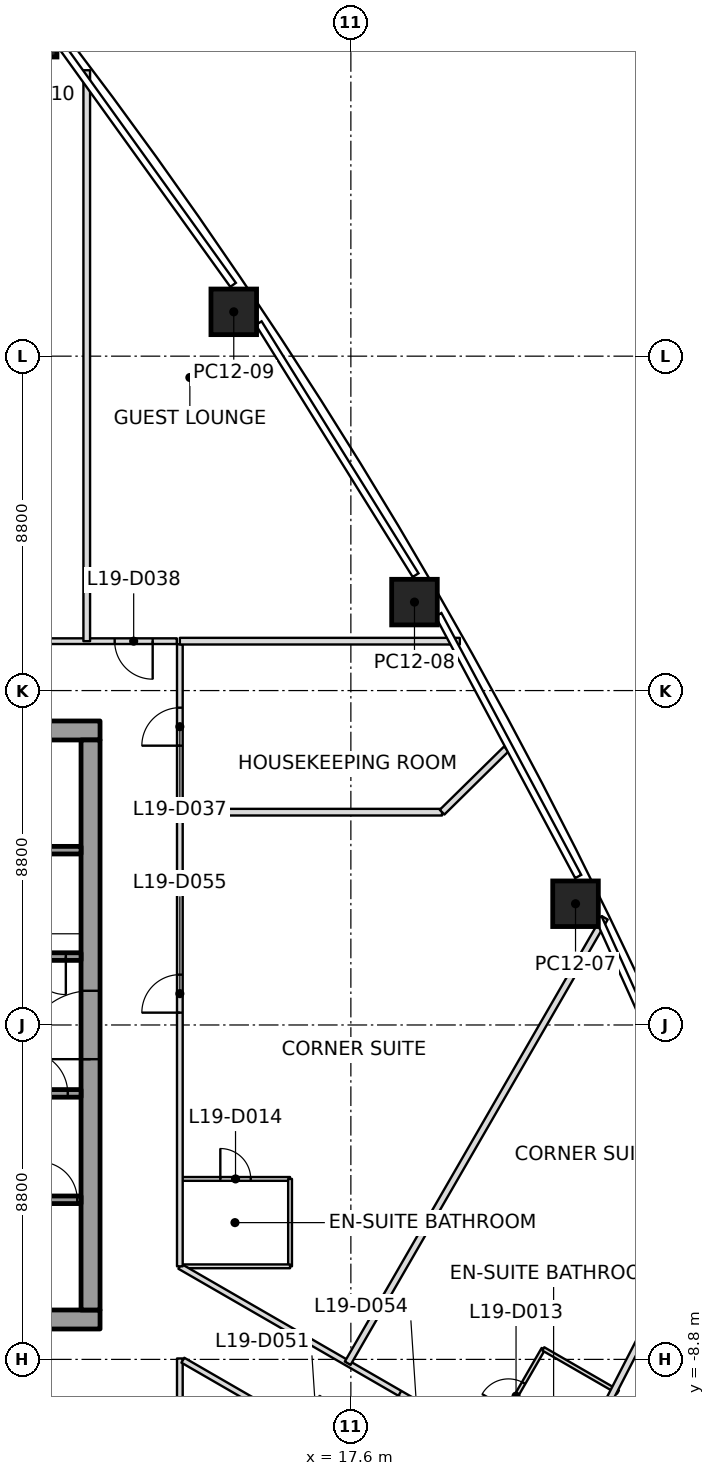
"""IFC4 building model, lengths in metres.
Left out: names, types, materials, properties, quantities, classifications, styles, units other than length and angle.
Written with IfcOpenShell. Run it as: python <this file> out.ifc"""

import sys

from ifc_helpers import new_model, si_unit, direction, frame, frame_2d, origin, origin_2d, place, context, subcontext, project, spatial, rectangle, extrude, element, fill, save


model = new_model("IFC4")
c1 = context("Model", 3, precision=1e-05, world=origin(), true_north=direction((0.0, 1.0)))
c2 = subcontext(c1, "Body", "Model", "MODEL_VIEW")
j1 = project(units=[si_unit("LENGTHUNIT", "METRE"), si_unit("PLANEANGLEUNIT", "RADIAN")], contexts=[c1])
p1 = place(None, origin())
s1 = spatial("IfcSite", under=j1, at=p1, CompositionType="ELEMENT")
p2 = place(p1, origin())
s2 = spatial("IfcBuilding", under=s1, at=p2, CompositionType="ELEMENT")
p3 = place(p2, frame((0.0, 0.0, 92.4)))
s3 = spatial("IfcBuildingStorey", under=s2, at=p3, CompositionType="ELEMENT", Elevation=92.4)
p4 = place(p3, frame((23.512, 3.19, 0.0), z_axis=(-0.015305637388, 0.002243067548, 0.999880345898), x_axis=(-0.441317903512, 0.897307986586, -0.008768423407)))
e1 = element("IfcColumn", 1, at=p4, inside=s3, PredefinedType="COLUMN", context=c2, shape_type="SweptSolid", body=[
    extrude(rectangle(XDim=1.2, YDim=1.2, at=origin_2d()), origin(), (0.0, 0.0, 1.0), 3.701),
])
p5 = place(p3, frame((19.274, 11.128, 0.0), z_axis=(-0.010688020009, -0.006201690622, 0.999923649716), x_axis=(-0.499971440741, 0.866041891424, 2.7221193e-05)))
e2 = element("IfcColumn", 2, at=p5, inside=s3, PredefinedType="COLUMN", context=c2, shape_type="SweptSolid", body=[
    extrude(rectangle(XDim=1.2, YDim=1.2, at=origin_2d()), origin(), (0.0, 0.0, 1.0), 3.7),
])
p6 = place(p3, frame((14.519, 18.767, 0.0), z_axis=(-0.005673642186, -0.014382023216, 0.999880476453), x_axis=(-0.556412833057, 0.830859453665, 0.008793603672)))
e3 = element("IfcColumn", 3, at=p6, inside=s3, PredefinedType="COLUMN", context=c2, shape_type="SweptSolid", body=[
    extrude(rectangle(XDim=1.2, YDim=1.2, at=origin_2d()), origin(), (0.0, 0.0, 1.0), 3.701),
])
p7 = place(p3, frame((9.266, 26.073, 0.0), z_axis=(-0.000197892201, -0.02229585459, 0.999751396952), x_axis=(-0.610385732105, 0.79191010258, 0.017539882388)))
e4 = element("IfcColumn", 4, at=p7, inside=s3, PredefinedType="COLUMN", context=c2, shape_type="SweptSolid", body=[
    extrude(rectangle(XDim=1.2, YDim=1.2, at=origin_2d()), origin(), (0.0, 0.0, 1.0), 3.701),
])
p8 = place(p3, frame((-11.0, -7.75, 0.0), z_axis=(0.0, 0.0, 1.0), x_axis=(1.0, 0.0, 0.0)))
e5 = element("IfcWall", 5, at=p8, inside=s3, PredefinedType="SHEAR", context=c2, shape_type="SweptSolid", body=[
    extrude(rectangle(XDim=22.0, YDim=0.5, at=frame_2d((11.0, 0.0))), origin(), (0.0, 0.0, 1.0), 3.7),
])
p9 = place(p8, frame((10.45, 0.0, 0.0)))
e6 = element("IfcOpeningElement", 6, at=p9, cuts=e5, PredefinedType="OPENING", context=c2, shape_type="SweptSolid", body=[
    extrude(rectangle(XDim=1.1, YDim=2.1, at=frame_2d((0.55, 1.05))), frame((0.0, 0.25, 0.0), z_axis=(0.0, -1.0, 0.0), x_axis=(1.0, 0.0, 0.0)), (0.0, 0.0, 1.0), 0.5),
])
p10 = place(p3, frame((-11.0, 7.75, 0.0), z_axis=(0.0, 0.0, 1.0), x_axis=(1.0, 0.0, 0.0)))
e7 = element("IfcWall", 7, at=p10, inside=s3, PredefinedType="SHEAR", context=c2, shape_type="SweptSolid", body=[
    extrude(rectangle(XDim=22.0, YDim=0.5, at=frame_2d((11.0, 0.0))), origin(), (0.0, 0.0, 1.0), 3.7),
])
p11 = place(p10, frame((10.45, 0.0, 0.0)))
e8 = element("IfcOpeningElement", 8, at=p11, cuts=e7, PredefinedType="OPENING", context=c2, shape_type="SweptSolid", body=[
    extrude(rectangle(XDim=1.1, YDim=2.1, at=frame_2d((0.55, 1.05))), frame((0.0, 0.25, 0.0), z_axis=(0.0, -1.0, 0.0), x_axis=(1.0, 0.0, 0.0)), (0.0, 0.0, 1.0), 0.5),
])
p12 = place(p3, frame((10.75, -7.5, 0.0), z_axis=(0.0, 0.0, 1.0), x_axis=(0.0, 1.0, 0.0)))
e9 = element("IfcWall", 9, at=p12, inside=s3, PredefinedType="SHEAR", context=c2, shape_type="SweptSolid", body=[
    extrude(rectangle(XDim=15.0, YDim=0.5, at=frame_2d((7.5, 0.0))), origin(), (0.0, 0.0, 1.0), 3.7),
])
p13 = place(p12, frame((6.6, 0.0, 0.0)))
e10 = element("IfcOpeningElement", 10, at=p13, cuts=e9, PredefinedType="OPENING", context=c2, shape_type="SweptSolid", body=[
    extrude(rectangle(XDim=1.8, YDim=2.1, at=frame_2d((0.9, 1.05))), frame((0.0, 0.25, 0.0), z_axis=(0.0, -1.0, 0.0), x_axis=(1.0, 0.0, 0.0)), (0.0, 0.0, 1.0), 0.5),
])
p14 = place(p3, frame((8.7, -4.6, 0.0), z_axis=(0.0, 0.0, 1.0), x_axis=(1.0, 0.0, 0.0)))
e11 = element("IfcWall", 11, at=p14, inside=s3, PredefinedType="SOLIDWALL", context=c2, shape_type="SweptSolid", body=[
    extrude(rectangle(XDim=1.8, YDim=0.2, at=frame_2d((0.9, 0.0))), origin(), (0.0, 0.0, 1.0), 3.55),
])
p15 = place(p14, frame((0.7, 0.0, 0.0)))
e12 = element("IfcOpeningElement", 12, at=p15, cuts=e11, PredefinedType="OPENING", context=c2, shape_type="SweptSolid", body=[
    extrude(rectangle(XDim=1.0, YDim=2.1, at=frame_2d((0.5, 1.05))), frame((0.0, 0.1, 0.0), z_axis=(0.0, -1.0, 0.0), x_axis=(1.0, 0.0, 0.0)), (0.0, 0.0, 1.0), 0.2),
])
p16 = place(p3, frame((8.7, -1.8, 0.0), z_axis=(0.0, 0.0, 1.0), x_axis=(1.0, 0.0, 0.0)))
e13 = element("IfcWall", 13, at=p16, inside=s3, PredefinedType="SOLIDWALL", context=c2, shape_type="SweptSolid", body=[
    extrude(rectangle(XDim=1.8, YDim=0.2, at=frame_2d((0.9, 0.0))), origin(), (0.0, 0.0, 1.0), 3.55),
])
p17 = place(p16, frame((0.35, 0.0, 0.0)))
e14 = element("IfcOpeningElement", 14, at=p17, cuts=e13, PredefinedType="OPENING", context=c2, shape_type="SweptSolid", body=[
    extrude(rectangle(XDim=1.1, YDim=2.1, at=frame_2d((0.55, 1.05))), frame((0.0, 0.1, 0.0), z_axis=(0.0, -1.0, 0.0), x_axis=(1.0, 0.0, 0.0)), (0.0, 0.0, 1.0), 0.2),
])
p18 = place(p3, frame((10.5, 1.8, 0.0), z_axis=(0.0, 0.0, 1.0), x_axis=(-1.0, 0.0, 0.0)))
e15 = element("IfcWall", 15, at=p18, inside=s3, PredefinedType="SOLIDWALL", context=c2, shape_type="SweptSolid", body=[
    extrude(rectangle(XDim=1.8, YDim=0.2, at=frame_2d((0.9, 0.0))), origin(), (0.0, 0.0, 1.0), 3.55),
])
p19 = place(p18, frame((0.4, 0.0, 0.0)))
e16 = element("IfcOpeningElement", 16, at=p19, cuts=e15, PredefinedType="OPENING", context=c2, shape_type="SweptSolid", body=[
    extrude(rectangle(XDim=1.0, YDim=2.1, at=frame_2d((0.5, 1.05))), frame((0.0, 0.1, 0.0), z_axis=(0.0, -1.0, 0.0), x_axis=(1.0, 0.0, 0.0)), (0.0, 0.0, 1.0), 0.2),
])
p20 = place(p3, frame((10.5, 4.6, 0.0), z_axis=(0.0, 0.0, 1.0), x_axis=(-1.0, 0.0, 0.0)))
e17 = element("IfcWall", 17, at=p20, inside=s3, PredefinedType="SOLIDWALL", context=c2, shape_type="SweptSolid", body=[
    extrude(rectangle(XDim=1.8, YDim=0.2, at=frame_2d((0.9, 0.0))), origin(), (0.0, 0.0, 1.0), 3.55),
])
p21 = place(p3, frame((10.65, 25.124, 0.0), z_axis=(0.0, 0.0, 1.0), x_axis=(0.0, -1.0, 0.0)))
e18 = element("IfcWall", 18, at=p21, inside=s3, PredefinedType="PARTITIONING", context=c2, shape_type="SweptSolid", body=[
    extrude(rectangle(XDim=15.024, YDim=0.175, at=frame_2d((7.512, 0.0))), origin(), (0.0, 0.0, 1.0), 2.934),
])
p22 = place(p3, frame((13.1, 5.6, 0.0), z_axis=(0.0, 0.0, 1.0), x_axis=(1.0, 0.0, 0.0)))
e19 = element("IfcWall", 19, at=p22, inside=s3, PredefinedType="PARTITIONING", context=c2, shape_type="SweptSolid", body=[
    extrude(rectangle(XDim=6.9, YDim=0.175, at=frame_2d((3.45, 0.0))), origin(), (0.0, 0.0, 1.0), 3.017),
])
p23 = place(p3, frame((20.0, 5.6, 0.0), z_axis=(0.0, 0.0, 1.0), x_axis=(0.712635597267, 0.701534393675, 0.0)))
e20 = element("IfcWall", 20, at=p23, inside=s3, PredefinedType="PARTITIONING", context=c2, shape_type="SweptSolid", body=[
    extrude(rectangle(XDim=2.375, YDim=0.175, at=frame_2d((1.188, 0.0))), origin(), (0.0, 0.0, 1.0), 2.934),
])
p24 = place(p3, frame((13.1, 10.1, 0.0), z_axis=(0.0, 0.0, 1.0), x_axis=(1.0, 0.0, 0.0)))
e21 = element("IfcWall", 21, at=p24, inside=s3, PredefinedType="PARTITIONING", context=c2, shape_type="SweptSolid", body=[
    extrude(rectangle(XDim=7.367, YDim=0.175, at=frame_2d((3.684, 0.0))), origin(), (0.0, 0.0, 1.0), 2.934),
])
p25 = place(p3, frame((17.517, -8.901, 0.0), z_axis=(0.0, 0.0, 1.0), x_axis=(0.500006156857, 0.866021849092, 0.0)))
e22 = element("IfcWall", 22, at=p25, inside=s3, PredefinedType="PARTITIONING", context=c2, shape_type="SweptSolid", body=[
    extrude(rectangle(XDim=13.532, YDim=0.175, at=frame_2d((6.766, 0.0))), origin(), (0.0, 0.0, 1.0), 2.934),
])
p26 = place(p3, frame((27.253, -4.326, 0.0), z_axis=(0.0, 0.0, 1.0), x_axis=(-0.457797857942, -0.889056309389, 0.0)))
e23 = element("IfcWall", 23, at=p26, inside=s3, PredefinedType="PARTITIONING", context=c2, shape_type="SweptSolid", body=[
    extrude(rectangle(XDim=8.84, YDim=0.175, at=frame_2d((4.42, 0.0))), origin(), (0.0, 0.0, 1.0), 3.15),
])
p27 = place(p3, frame((13.02, 10.1, 0.0), z_axis=(0.0, 0.0, 1.0), x_axis=(-1.0, 0.0, 0.0)))
e24 = element("IfcWall", 24, at=p27, inside=s3, PredefinedType="PARTITIONING", context=c2, shape_type="SweptSolid", body=[
    extrude(rectangle(XDim=11.97, YDim=0.15, at=frame_2d((5.985, 0.0))), origin(), (0.0, 0.0, 1.0), 2.947),
])
p28 = place(p27, frame((0.635, 0.0, 0.0)))
e25 = element("IfcOpeningElement", 25, at=p28, cuts=e24, PredefinedType="OPENING", context=c2, shape_type="SweptSolid", body=[
    extrude(rectangle(XDim=1.0, YDim=2.1, at=frame_2d((0.5, 1.05))), frame((0.0, 0.075, 0.0), z_axis=(0.0, -1.0, 0.0), x_axis=(1.0, 0.0, 0.0)), (0.0, 0.0, 1.0), 0.15),
])
p29 = place(p3, frame((13.1, -10.02, 0.0), z_axis=(0.0, 0.0, 1.0), x_axis=(0.0, 1.0, 0.0)))
e26 = element("IfcWall", 26, at=p29, inside=s3, PredefinedType="PARTITIONING", context=c2, shape_type="SweptSolid", body=[
    extrude(rectangle(XDim=1.244, YDim=0.15, at=frame_2d((0.622, 0.0))), origin(), (0.0, 0.0, 1.0), 2.797),
])
p30 = place(p3, frame((13.179, -8.822, 0.0), z_axis=(0.0, 0.0, 1.0), x_axis=(0.866025889145, -0.499999159329, 0.0)))
e27 = element("IfcWall", 27, at=p30, inside=s3, PredefinedType="PARTITIONING", context=c2, shape_type="SweptSolid", body=[
    extrude(rectangle(XDim=10.285, YDim=0.15, at=frame_2d((5.143, 0.0))), origin(), (0.0, 0.0, 1.0), 2.797),
])
p31 = place(p30, frame((3.587, 0.0, 0.0)))
e28 = element("IfcOpeningElement", 28, at=p31, cuts=e27, PredefinedType="OPENING", context=c2, shape_type="SweptSolid", body=[
    extrude(rectangle(XDim=1.0, YDim=2.1, at=frame_2d((0.5, 1.05))), frame((0.0, 0.075, 0.0), z_axis=(0.0, -1.0, 0.0), x_axis=(1.0, 0.0, 0.0)), (0.0, 0.0, 1.0), 0.15),
])
p32 = place(p30, frame((7.615, 0.0, 0.0)))
e29 = element("IfcOpeningElement", 29, at=p32, cuts=e27, PredefinedType="OPENING", context=c2, shape_type="SweptSolid", body=[
    extrude(rectangle(XDim=1.0, YDim=2.1, at=frame_2d((0.5, 1.05))), frame((0.0, 0.075, 0.0), z_axis=(0.0, -1.0, 0.0), x_axis=(1.0, 0.0, 0.0)), (0.0, 0.0, 1.0), 0.15),
])
p33 = place(p3, frame((23.136, -12.145, 0.0), z_axis=(0.0, 0.0, 1.0), x_axis=(-0.866028069402, 0.499995382986, 0.0)))
e30 = element("IfcWall", 30, at=p33, inside=s3, PredefinedType="PARTITIONING", context=c2, shape_type="SweptSolid", body=[
    extrude(rectangle(XDim=11.589, YDim=0.15, at=frame_2d((5.794, 0.0))), origin(), (0.0, 0.0, 1.0), 2.947),
])
p34 = place(p33, frame((3.905, 0.0, 0.0)))
e31 = element("IfcOpeningElement", 31, at=p34, cuts=e30, PredefinedType="OPENING", context=c2, shape_type="SweptSolid", body=[
    extrude(rectangle(XDim=1.0, YDim=2.1, at=frame_2d((0.5, 1.05))), frame((0.0, 0.075, 0.0), z_axis=(0.0, -1.0, 0.0), x_axis=(1.0, 0.0, 0.0)), (0.0, 0.0, 1.0), 0.15),
])
p35 = place(p3, frame((13.1, -6.351, 0.0), z_axis=(0.0, 0.0, 1.0), x_axis=(0.0, 1.0, 0.0)))
e32 = element("IfcWall", 32, at=p35, inside=s3, PredefinedType="PARTITIONING", context=c2, shape_type="SweptSolid", body=[
    extrude(rectangle(XDim=16.371, YDim=0.15, at=frame_2d((8.186, 0.0))), origin(), (0.0, 0.0, 1.0), 2.947),
])
p36 = place(p35, frame((13.701, 0.0, 0.0)))
e33 = element("IfcOpeningElement", 33, at=p36, cuts=e32, PredefinedType="OPENING", context=c2, shape_type="SweptSolid", body=[
    extrude(rectangle(XDim=1.0, YDim=2.1, at=frame_2d((0.5, 1.05))), frame((0.0, 0.075, 0.0), z_axis=(0.0, -1.0, 0.0), x_axis=(1.0, 0.0, 0.0)), (0.0, 0.0, 1.0), 0.15),
])
p37 = place(p35, frame((6.676, 0.0, 0.0)))
e34 = element("IfcOpeningElement", 34, at=p37, cuts=e32, PredefinedType="OPENING", context=c2, shape_type="SweptSolid", body=[
    extrude(rectangle(XDim=1.0, YDim=2.1, at=frame_2d((0.5, 1.05))), frame((0.0, 0.075, 0.0), z_axis=(0.0, -1.0, 0.0), x_axis=(1.0, 0.0, 0.0)), (0.0, 0.0, 1.0), 0.15),
])
p38 = place(p3, frame((13.13, -4.051, 0.0), z_axis=(0.0, 0.0, 1.0), x_axis=(1.0, 0.0, 0.0)))
e35 = element("IfcWall", 35, at=p38, inside=s3, PredefinedType="PARTITIONING", context=c2, shape_type="SweptSolid", body=[
    extrude(rectangle(XDim=2.87, YDim=0.1, at=frame_2d((1.435, 0.0))), origin(), (0.0, 0.0, 1.0), 2.947),
])
p39 = place(p38, frame((1.035, 0.0, 0.0)))
e36 = element("IfcOpeningElement", 36, at=p39, cuts=e35, PredefinedType="OPENING", context=c2, shape_type="SweptSolid", body=[
    extrude(rectangle(XDim=0.8, YDim=2.1, at=frame_2d((0.4, 1.05))), frame((0.0, 0.05, 0.0), z_axis=(0.0, -1.0, 0.0), x_axis=(1.0, 0.0, 0.0)), (0.0, 0.0, 1.0), 0.1),
])
p40 = place(p3, frame((16.0, -4.051, 0.0), z_axis=(0.0, 0.0, 1.0), x_axis=(0.0, -1.0, 0.0)))
e37 = element("IfcWall", 37, at=p40, inside=s3, PredefinedType="PARTITIONING", context=c2, shape_type="SweptSolid", body=[
    extrude(rectangle(XDim=2.3, YDim=0.1, at=frame_2d((1.15, 0.0))), origin(), (0.0, 0.0, 1.0), 3.15),
])
p41 = place(p3, frame((16.0, -6.351, 0.0), z_axis=(0.0, 0.0, 1.0), x_axis=(-1.0, 0.0, 0.0)))
e38 = element("IfcWall", 38, at=p41, inside=s3, PredefinedType="PARTITIONING", context=c2, shape_type="SweptSolid", body=[
    extrude(rectangle(XDim=2.84, YDim=0.1, at=frame_2d((1.42, 0.0))), origin(), (0.0, 0.0, 1.0), 3.15),
])
p42 = place(p3, frame((21.229, -11.01, 0.0), z_axis=(0.0, 0.0, 1.0), x_axis=(0.499999802827, 0.866025517622, 0.0)))
e39 = element("IfcWall", 39, at=p42, inside=s3, PredefinedType="PARTITIONING", context=c2, shape_type="SweptSolid", body=[
    extrude(rectangle(XDim=2.87, YDim=0.1, at=frame_2d((1.435, 0.0))), origin(), (0.0, 0.0, 1.0), 3.15),
])
p43 = place(p42, frame((1.035, 0.0, 0.0)))
e40 = element("IfcOpeningElement", 40, at=p43, cuts=e39, PredefinedType="OPENING", context=c2, shape_type="SweptSolid", body=[
    extrude(rectangle(XDim=0.8, YDim=2.1, at=frame_2d((0.4, 1.05))), frame((0.0, 0.05, 0.0), z_axis=(0.0, -1.0, 0.0), x_axis=(1.0, 0.0, 0.0)), (0.0, 0.0, 1.0), 0.1),
])
p44 = place(p3, frame((22.664, -8.524, 0.0), z_axis=(0.0, 0.0, 1.0), x_axis=(0.866017224141, -0.500014167291, 0.0)))
e41 = element("IfcWall", 41, at=p44, inside=s3, PredefinedType="PARTITIONING", context=c2, shape_type="SweptSolid", body=[
    extrude(rectangle(XDim=2.27, YDim=0.1, at=frame_2d((1.135, 0.0))), origin(), (0.0, 0.0, 1.0), 3.15),
])
p45 = place(p36, origin())
e42 = element("IfcDoor", 42, at=p45, inside=s3, OperationType="SINGLE_SWING_RIGHT", PredefinedType="DOOR", context=c2, shape_type="SweptSolid", body=[
    extrude(rectangle(XDim=1.0, YDim=2.1, at=frame_2d((0.5, 1.05))), frame((0.0, 0.025, 0.0), z_axis=(0.0, -1.0, 0.0), x_axis=(1.0, 0.0, 0.0)), (0.0, 0.0, 1.0), 0.05),
])
fill(e33, e42)
p46 = place(p28, origin())
e43 = element("IfcDoor", 43, at=p46, inside=s3, OperationType="SINGLE_SWING_LEFT", PredefinedType="DOOR", context=c2, shape_type="SweptSolid", body=[
    extrude(rectangle(XDim=1.0, YDim=2.1, at=frame_2d((0.5, 1.05))), frame((0.0, 0.025, 0.0), z_axis=(0.0, -1.0, 0.0), x_axis=(1.0, 0.0, 0.0)), (0.0, 0.0, 1.0), 0.05),
])
fill(e25, e43)
p47 = place(p34, origin())
e44 = element("IfcDoor", 44, at=p47, inside=s3, OperationType="SINGLE_SWING_LEFT", PredefinedType="DOOR", context=c2, shape_type="SweptSolid", body=[
    extrude(rectangle(XDim=1.0, YDim=2.1, at=frame_2d((0.5, 1.05))), frame((0.0, 0.025, 0.0), z_axis=(0.0, -1.0, 0.0), x_axis=(1.0, 0.0, 0.0)), (0.0, 0.0, 1.0), 0.05),
])
fill(e31, e44)
p48 = place(p43, origin())
e45 = element("IfcDoor", 45, at=p48, inside=s3, OperationType="SINGLE_SWING_LEFT", PredefinedType="DOOR", context=c2, shape_type="SweptSolid", body=[
    extrude(rectangle(XDim=0.8, YDim=2.1, at=frame_2d((0.4, 1.05))), frame((0.0, 0.025, 0.0), z_axis=(0.0, -1.0, 0.0), x_axis=(1.0, 0.0, 0.0)), (0.0, 0.0, 1.0), 0.05),
])
fill(e40, e45)
p49 = place(p37, origin())
e46 = element("IfcDoor", 46, at=p49, inside=s3, OperationType="SINGLE_SWING_LEFT", PredefinedType="DOOR", context=c2, shape_type="SweptSolid", body=[
    extrude(rectangle(XDim=1.0, YDim=2.1, at=frame_2d((0.5, 1.05))), frame((0.0, 0.025, 0.0), z_axis=(0.0, -1.0, 0.0), x_axis=(1.0, 0.0, 0.0)), (0.0, 0.0, 1.0), 0.05),
])
fill(e34, e46)
p50 = place(p39, origin())
e47 = element("IfcDoor", 47, at=p50, inside=s3, OperationType="SINGLE_SWING_LEFT", PredefinedType="DOOR", context=c2, shape_type="SweptSolid", body=[
    extrude(rectangle(XDim=0.8, YDim=2.1, at=frame_2d((0.4, 1.05))), frame((0.0, 0.025, 0.0), z_axis=(0.0, -1.0, 0.0), x_axis=(1.0, 0.0, 0.0)), (0.0, 0.0, 1.0), 0.05),
])
fill(e36, e47)
p51 = place(p17, origin())
e48 = element("IfcDoor", 48, at=p51, inside=s3, OperationType="SINGLE_SWING_RIGHT", PredefinedType="DOOR", context=c2, shape_type="SweptSolid", body=[
    extrude(rectangle(XDim=1.1, YDim=2.1, at=frame_2d((0.55, 1.05))), frame((0.0, 0.025, 0.0), z_axis=(0.0, -1.0, 0.0), x_axis=(1.0, 0.0, 0.0)), (0.0, 0.0, 1.0), 0.05),
])
fill(e14, e48)
p52 = place(p19, origin())
e49 = element("IfcDoor", 49, at=p52, inside=s3, OperationType="SINGLE_SWING_RIGHT", PredefinedType="DOOR", context=c2, shape_type="SweptSolid", body=[
    extrude(rectangle(XDim=1.0, YDim=2.1, at=frame_2d((0.5, 1.05))), frame((0.0, 0.025, 0.0), z_axis=(0.0, -1.0, 0.0), x_axis=(1.0, 0.0, 0.0)), (0.0, 0.0, 1.0), 0.05),
])
fill(e16, e49)
p53 = place(p15, origin())
e50 = element("IfcDoor", 50, at=p53, inside=s3, OperationType="SINGLE_SWING_RIGHT", PredefinedType="DOOR", context=c2, shape_type="SweptSolid", body=[
    extrude(rectangle(XDim=1.0, YDim=2.1, at=frame_2d((0.5, 1.05))), frame((0.0, 0.025, 0.0), z_axis=(0.0, -1.0, 0.0), x_axis=(1.0, 0.0, 0.0)), (0.0, 0.0, 1.0), 0.05),
])
fill(e12, e50)
p54 = place(p13, origin())
e51 = element("IfcDoor", 51, at=p54, inside=s3, OperationType="DOUBLE_DOOR_SINGLE_SWING", PredefinedType="DOOR", context=c2, shape_type="SweptSolid", body=[
    extrude(rectangle(XDim=1.8, YDim=2.1, at=frame_2d((0.9, 1.05))), frame((0.0, 0.025, 0.0), z_axis=(0.0, -1.0, 0.0), x_axis=(1.0, 0.0, 0.0)), (0.0, 0.0, 1.0), 0.05),
])
fill(e10, e51)
save(model, sys.argv[1])
